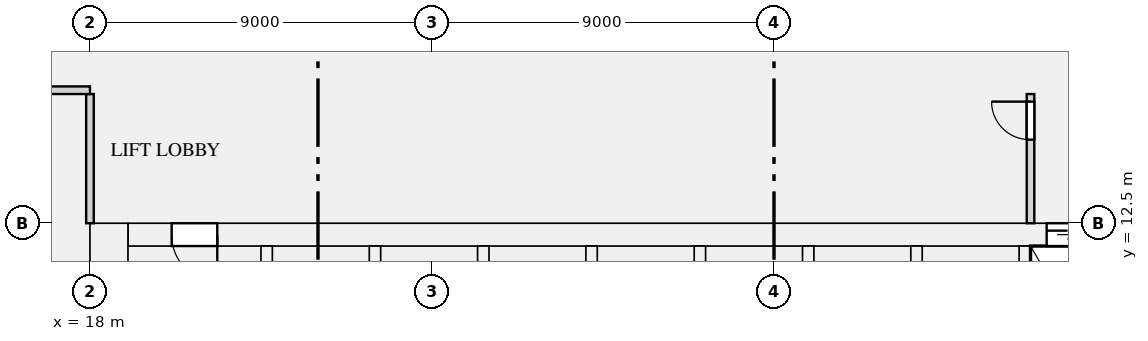
"""IFC4 building model, lengths in metres.
Left out: names, types, materials, properties, quantities, classifications, styles, units other than length and angle.
Written with IfcOpenShell. Run it as: python <this file> out.ifc"""

import sys

from ifc_helpers import new_model, si_unit, direction, frame, frame_2d, origin, place, context, subcontext, project, spatial, rectangle, extrude, element, fill, save


model = new_model("IFC4")
c1 = context("Model", 3, precision=1e-05, world=origin(), true_north=direction((0.0, 1.0)))
c2 = subcontext(c1, "Body", "Model", "MODEL_VIEW")
j1 = project(units=[si_unit("LENGTHUNIT", "METRE"), si_unit("PLANEANGLEUNIT", "RADIAN")], contexts=[c1])
p1 = place(None, origin())
s1 = spatial("IfcSite", under=j1, at=p1, CompositionType="ELEMENT")
p2 = place(p1, origin())
s2 = spatial("IfcBuilding", under=s1, at=p2, CompositionType="ELEMENT")
p3 = place(p2, frame((0.0, 0.0, -6.0)))
s3 = spatial("IfcBuildingStorey", under=s2, at=p3, CompositionType="ELEMENT", Elevation=-6.0)
p4 = place(p3, frame((18.5, 0.0, -0.5), z_axis=(0.0, 0.0, 1.0), x_axis=(0.0, 1.0, 0.0)))
e1 = element("IfcWall", 1, at=p4, inside=s3, PredefinedType="SHEAR", context=c2, shape_type="SweptSolid", body=[
    extrude(rectangle(XDim=12.5, YDim=1.0, at=frame_2d((6.25, 0.0))), origin(), (0.0, 0.0, 1.0), 6.5),
])
p5 = place(p3, frame((19.0, 12.2, -0.5), z_axis=(0.0, 0.0, 1.0), x_axis=(1.0, 0.0, 0.0)))
e2 = element("IfcWall", 2, at=p5, inside=s3, PredefinedType="SHEAR", context=c2, shape_type="SweptSolid", body=[
    extrude(rectangle(XDim=34.0, YDim=0.6, at=frame_2d((17.0, 0.0))), origin(), (0.0, 0.0, 1.0), 6.5),
])
p6 = place(p5, frame((24.175, 0.0, 0.5)))
e3 = element("IfcOpeningElement", 3, at=p6, cuts=e2, PredefinedType="OPENING", context=c2, shape_type="SweptSolid", body=[
    extrude(rectangle(XDim=1.1, YDim=2.1, at=frame_2d((0.55, 1.05))), frame((0.0, 0.31, 0.0), z_axis=(0.0, -1.0, 0.0), x_axis=(1.0, 0.0, 0.0)), (0.0, 0.0, 1.0), 0.62),
])
p7 = place(p5, frame((26.425, 0.0, 0.5)))
e4 = element("IfcOpeningElement", 4, at=p7, cuts=e2, PredefinedType="OPENING", context=c2, shape_type="SweptSolid", body=[
    extrude(rectangle(XDim=1.1, YDim=2.1, at=frame_2d((0.55, 1.05))), frame((0.0, 0.31, 0.0), z_axis=(0.0, -1.0, 0.0), x_axis=(1.0, 0.0, 0.0)), (0.0, 0.0, 1.0), 0.62),
])
p8 = place(p5, frame((1.15, 0.0, 0.5)))
e5 = element("IfcOpeningElement", 5, at=p8, cuts=e2, PredefinedType="OPENING", context=c2, shape_type="SweptSolid", body=[
    extrude(rectangle(XDim=1.2, YDim=2.1, at=frame_2d((0.6, 1.05))), frame((0.0, 0.31, 0.0), z_axis=(0.0, -1.0, 0.0), x_axis=(1.0, 0.0, 0.0)), (0.0, 0.0, 1.0), 0.62),
])
p9 = place(p5, frame((31.65, 0.0, 0.5)))
e6 = element("IfcOpeningElement", 6, at=p9, cuts=e2, PredefinedType="OPENING", context=c2, shape_type="SweptSolid", body=[
    extrude(rectangle(XDim=1.2, YDim=2.1, at=frame_2d((0.6, 1.05))), frame((0.0, 0.31, 0.0), z_axis=(0.0, -1.0, 0.0), x_axis=(1.0, 0.0, 0.0)), (0.0, 0.0, 1.0), 0.62),
])
for number, where, z_axis, x_axis in (
    (7, (22.65, 9.35, -0.5), (0.0, 0.0, 1.0), (0.0, 1.0, 0.0)),
    (8, (25.5, 9.35, -0.5), (0.0, 0.0, 1.0), (0.0, 1.0, 0.0)),
    (9, (28.35, 9.35, -0.5), (0.0, 0.0, 1.0), (0.0, 1.0, 0.0)),
    (10, (31.2, 9.35, -0.5), (0.0, 0.0, 1.0), (0.0, 1.0, 0.0)),
    (11, (34.05, 9.35, -0.5), (0.0, 0.0, 1.0), (0.0, 1.0, 0.0)),
    (12, (36.9, 9.35, -0.5), (0.0, 0.0, 1.0), (0.0, 1.0, 0.0)),
    (13, (39.75, 9.35, -0.5), (0.0, 0.0, 1.0), (0.0, 1.0, 0.0)),
):
    element("IfcWall", number, at=place(p3, frame(where, z_axis=z_axis, x_axis=x_axis)), inside=s3, PredefinedType="SHEAR", context=c2, shape_type="SweptSolid", body=[
        extrude(rectangle(XDim=2.55, YDim=0.3, at=frame_2d((1.275, 0.0))), origin(), (0.0, 0.0, 1.0), 6.5),
    ])
p10 = place(p3, frame((42.6, 8.25, -0.5), z_axis=(0.0, 0.0, 1.0), x_axis=(0.0, 1.0, 0.0)))
e14 = element("IfcWall", 14, at=p10, inside=s3, PredefinedType="SHEAR", context=c2, shape_type="SweptSolid", body=[
    extrude(rectangle(XDim=3.65, YDim=0.3, at=frame_2d((1.825, 0.0))), origin(), (0.0, 0.0, 1.0), 6.5),
])
p11 = place(p3, frame((18.0, 12.5, 0.0), z_axis=(0.0, 0.0, 1.0), x_axis=(0.0, 1.0, 0.0)))
e15 = element("IfcWall", 15, at=p11, inside=s3, PredefinedType="PARTITIONING", context=c2, shape_type="SweptSolid", body=[
    extrude(rectangle(XDim=3.4, YDim=0.2, at=frame_2d((1.7, 0.0))), origin(), (0.0, 0.0, 1.0), 5.598),
])
p12 = place(p3, frame((42.75, 12.5, 0.0), z_axis=(0.0, 0.0, 1.0), x_axis=(0.0, 1.0, 0.0)))
e16 = element("IfcWall", 16, at=p12, inside=s3, PredefinedType="PARTITIONING", context=c2, shape_type="SweptSolid", body=[
    extrude(rectangle(XDim=3.4, YDim=0.2, at=frame_2d((1.7, 0.0))), origin(), (0.0, 0.0, 1.0), 5.598),
])
p13 = place(p12, frame((2.2, 0.0, 0.0)))
e17 = element("IfcOpeningElement", 17, at=p13, cuts=e16, PredefinedType="OPENING", context=c2, shape_type="SweptSolid", body=[
    extrude(rectangle(XDim=1.0, YDim=2.1, at=frame_2d((0.5, 1.05))), frame((0.0, 0.11, 0.0), z_axis=(0.0, -1.0, 0.0), x_axis=(1.0, 0.0, 0.0)), (0.0, 0.0, 1.0), 0.22),
])
p14 = place(p3, frame((0.0, 16.0, 0.0), z_axis=(0.0, 0.0, 1.0), x_axis=(1.0, 0.0, 0.0)))
e18 = element("IfcWall", 18, at=p14, inside=s3, PredefinedType="PARTITIONING", context=c2, shape_type="SweptSolid", body=[
    extrude(rectangle(XDim=18.0, YDim=0.2, at=frame_2d((9.0, 0.0))), origin(), (0.0, 0.0, 1.0), 5.598),
])
p15 = place(p14, frame((8.1, 0.0, 0.0)))
e19 = element("IfcOpeningElement", 19, at=p15, cuts=e18, PredefinedType="OPENING", context=c2, shape_type="SweptSolid", body=[
    extrude(rectangle(XDim=1.8, YDim=2.4, at=frame_2d((0.9, 1.2))), frame((0.0, 0.11, 0.0), z_axis=(0.0, -1.0, 0.0), x_axis=(1.0, 0.0, 0.0)), (0.0, 0.0, 1.0), 0.22),
])
p16 = place(p6, origin())
e20 = element("IfcDoor", 20, at=p16, inside=s3, OperationType="DOUBLE_DOOR_SLIDING", PredefinedType="DOOR", context=c2, shape_type="SweptSolid", body=[
    extrude(rectangle(XDim=1.1, YDim=2.1, at=frame_2d((0.55, 1.05))), frame((0.0, 0.025, 0.0), z_axis=(0.0, -1.0, 0.0), x_axis=(1.0, 0.0, 0.0)), (0.0, 0.0, 1.0), 0.05),
])
fill(e3, e20)
p17 = place(p8, frame((1.2, 0.0, 0.0), z_axis=(0.0, 0.0, 1.0), x_axis=(-1.0, 0.0, 0.0)))
e21 = element("IfcDoor", 21, at=p17, inside=s3, OperationType="SINGLE_SWING_LEFT", PredefinedType="DOOR", context=c2, shape_type="SweptSolid", body=[
    extrude(rectangle(XDim=1.2, YDim=2.1, at=frame_2d((0.6, 1.05))), frame((0.0, 0.025, 0.0), z_axis=(0.0, -1.0, 0.0), x_axis=(1.0, 0.0, 0.0)), (0.0, 0.0, 1.0), 0.05),
])
fill(e5, e21)
p18 = place(p13, origin())
e22 = element("IfcDoor", 22, at=p18, inside=s3, OperationType="SINGLE_SWING_RIGHT", PredefinedType="DOOR", context=c2, shape_type="SweptSolid", body=[
    extrude(rectangle(XDim=1.0, YDim=2.1, at=frame_2d((0.5, 1.05))), frame((0.0, 0.025, 0.0), z_axis=(0.0, -1.0, 0.0), x_axis=(1.0, 0.0, 0.0)), (0.0, 0.0, 1.0), 0.05),
])
fill(e17, e22)
save(model, sys.argv[1])
